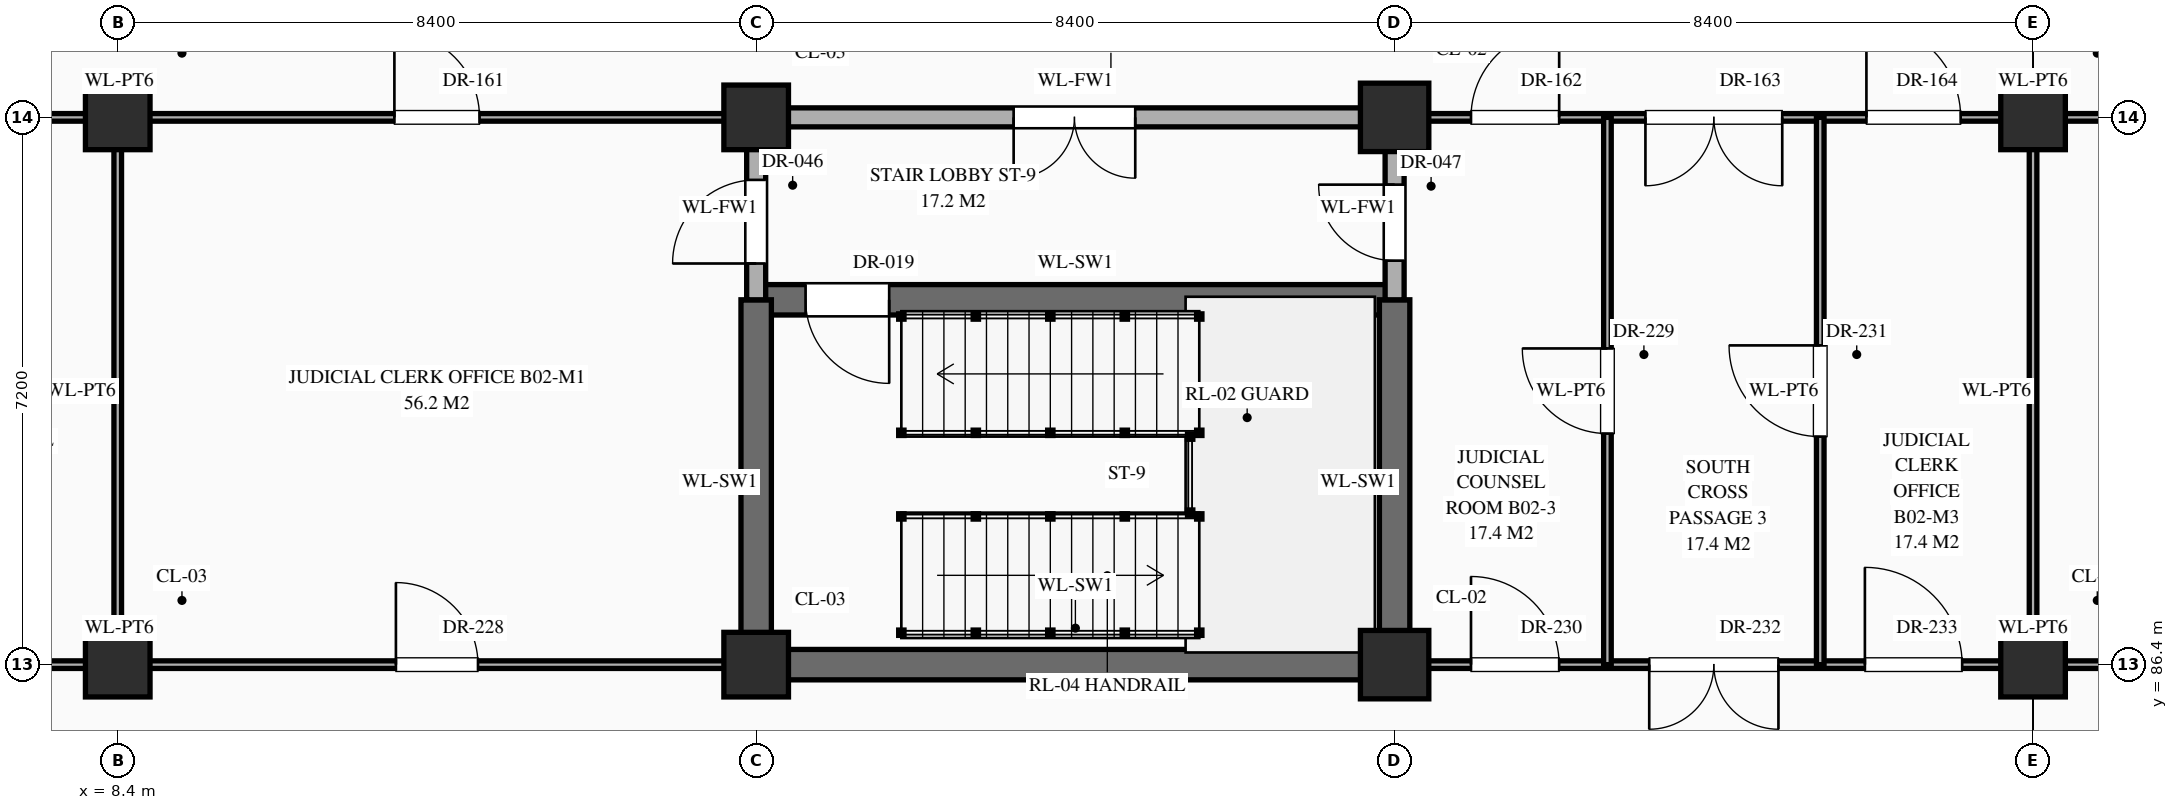
"""IFC4 building model, lengths in metres.
Left out: names, types, materials, properties, quantities, classifications, styles, units other than length and angle.
Written with IfcOpenShell. Run it as: python <this file> out.ifc"""

import sys

from ifc_helpers import new_model, si_unit, direction, frame, frame_2d, origin, origin_2d, place, context, subcontext, project, spatial, rectangle, extrude, element, fill, save


model = new_model("IFC4")
c1 = context("Model", 3, precision=1e-05, world=origin(), true_north=direction((0.0, 1.0)))
c2 = subcontext(c1, "Body", "Model", "MODEL_VIEW")
j1 = project(units=[si_unit("LENGTHUNIT", "METRE"), si_unit("PLANEANGLEUNIT", "RADIAN")], contexts=[c1])
p1 = place(None, origin())
s1 = spatial("IfcSite", under=j1, at=p1, CompositionType="ELEMENT")
p2 = place(p1, origin())
s2 = spatial("IfcBuilding", under=s1, at=p2, CompositionType="ELEMENT")
p3 = place(p2, frame((0.0, 0.0, -10.2)))
s3 = spatial("IfcBuildingStorey", under=s2, at=p3, CompositionType="ELEMENT", Elevation=-10.2)
for number, where, z_axis, x_axis in (
    (1, (8.4, 86.4, 0.0), (0.0, 0.0, 1.0), (1.0, 0.0, 0.0)),
    (2, (8.4, 93.6, 0.0), (0.0, 0.0, 1.0), (1.0, 0.0, 0.0)),
    (3, (16.8, 86.4, 0.0), (0.0, 0.0, 1.0), (1.0, 0.0, 0.0)),
    (4, (16.8, 93.6, 0.0), (0.0, 0.0, 1.0), (1.0, 0.0, 0.0)),
):
    element("IfcColumn", number, at=place(p3, frame(where, z_axis=z_axis, x_axis=x_axis)), inside=s3, PredefinedType="COLUMN", context=c2, shape_type="SweptSolid", body=[
        extrude(rectangle(XDim=0.85, YDim=0.85, at=origin_2d()), origin(), (0.0, 0.0, 1.0), 4.8),
    ])
for number, where, z_axis, x_axis in (
    (5, (25.2, 86.4, 0.0), (0.0, 0.0, 1.0), (1.0, 0.0, 0.0)),
    (6, (25.2, 93.6, 0.0), (0.0, 0.0, 1.0), (1.0, 0.0, 0.0)),
):
    element("IfcColumn", number, at=place(p3, frame(where, z_axis=z_axis, x_axis=x_axis)), inside=s3, PredefinedType="COLUMN", context=c2, shape_type="SweptSolid", body=[
        extrude(rectangle(XDim=0.9, YDim=0.9, at=origin_2d()), origin(), (0.0, 0.0, 1.0), 4.8),
    ])
for number, where, z_axis, x_axis in (
    (7, (33.6, 86.4, 0.0), (0.0, 0.0, 1.0), (1.0, 0.0, 0.0)),
    (8, (33.6, 93.6, 0.0), (0.0, 0.0, 1.0), (1.0, 0.0, 0.0)),
):
    element("IfcColumn", number, at=place(p3, frame(where, z_axis=z_axis, x_axis=x_axis)), inside=s3, PredefinedType="COLUMN", context=c2, shape_type="SweptSolid", body=[
        extrude(rectangle(XDim=0.85, YDim=0.85, at=origin_2d()), origin(), (0.0, 0.0, 1.0), 4.8),
    ])
p4 = place(p3, frame((0.04, 86.4, 0.0), z_axis=(0.0, 0.0, 1.0), x_axis=(1.0, 0.0, 0.0)))
e9 = element("IfcWall", 9, at=p4, inside=s3, PredefinedType="STANDARD", context=c2, shape_type="SweptSolid", body=[
    extrude(rectangle(XDim=16.76, YDim=0.1, at=frame_2d((8.38, 0.0))), origin(), (0.0, 0.0, 1.0), 3.63),
])
p5 = place(p4, frame((1.073, 0.0, 0.0)))
e10 = element("IfcOpeningElement", 10, at=p5, cuts=e9, PredefinedType="OPENING", context=c2, shape_type="SweptSolid", body=[
    extrude(rectangle(XDim=0.92, YDim=2.15, at=frame_2d((0.46, 1.075))), frame((0.0, 0.062, 0.0), z_axis=(0.0, -1.0, 0.0), x_axis=(1.0, 0.0, 0.0)), (0.0, 0.0, 1.0), 0.124),
])
p6 = place(p4, frame((3.31, 0.0, 0.0)))
e11 = element("IfcOpeningElement", 11, at=p6, cuts=e9, PredefinedType="OPENING", context=c2, shape_type="SweptSolid", body=[
    extrude(rectangle(XDim=1.7, YDim=2.45, at=frame_2d((0.85, 1.225))), frame((0.0, 0.062, 0.0), z_axis=(0.0, -1.0, 0.0), x_axis=(1.0, 0.0, 0.0)), (0.0, 0.0, 1.0), 0.124),
])
p7 = place(p4, frame((6.268, 0.0, 0.0)))
e12 = element("IfcOpeningElement", 12, at=p7, cuts=e9, PredefinedType="OPENING", context=c2, shape_type="SweptSolid", body=[
    extrude(rectangle(XDim=1.04, YDim=2.2, at=frame_2d((0.52, 1.1))), frame((0.0, 0.062, 0.0), z_axis=(0.0, -1.0, 0.0), x_axis=(1.0, 0.0, 0.0)), (0.0, 0.0, 1.0), 0.124),
])
p8 = place(p4, frame((12.02, 0.0, 0.0)))
e13 = element("IfcOpeningElement", 13, at=p8, cuts=e9, PredefinedType="OPENING", context=c2, shape_type="SweptSolid", body=[
    extrude(rectangle(XDim=1.08, YDim=2.25, at=frame_2d((0.54, 1.125))), frame((0.0, 0.062, 0.0), z_axis=(0.0, -1.0, 0.0), x_axis=(1.0, 0.0, 0.0)), (0.0, 0.0, 1.0), 0.124),
])
p9 = place(p3, frame((16.8, 86.4, 0.0), z_axis=(0.0, 0.0, 1.0), x_axis=(1.0, 0.0, 0.0)))
e14 = element("IfcWall", 14, at=p9, inside=s3, PredefinedType="SHEAR", context=c2, shape_type="SweptSolid", body=[
    extrude(rectangle(XDim=8.4, YDim=0.4, at=frame_2d((4.2, 0.0))), origin(), (0.0, 0.0, 1.0), 4.48),
])
p10 = place(p3, frame((25.2, 86.4, 0.0), z_axis=(0.0, 0.0, 1.0), x_axis=(1.0, 0.0, 0.0)))
e15 = element("IfcWall", 15, at=p10, inside=s3, PredefinedType="STANDARD", context=c2, shape_type="SweptSolid", body=[
    extrude(rectangle(XDim=16.8, YDim=0.1, at=frame_2d((8.4, 0.0))), origin(), (0.0, 0.0, 1.0), 3.63),
])
p11 = place(p10, frame((1.005, 0.0, 0.0)))
e16 = element("IfcOpeningElement", 16, at=p11, cuts=e15, PredefinedType="OPENING", context=c2, shape_type="SweptSolid", body=[
    extrude(rectangle(XDim=1.16, YDim=2.3, at=frame_2d((0.58, 1.15))), frame((0.0, 0.062, 0.0), z_axis=(0.0, -1.0, 0.0), x_axis=(1.0, 0.0, 0.0)), (0.0, 0.0, 1.0), 0.124),
])
p12 = place(p10, frame((3.35, 0.0, 0.0)))
e17 = element("IfcOpeningElement", 17, at=p12, cuts=e15, PredefinedType="OPENING", context=c2, shape_type="SweptSolid", body=[
    extrude(rectangle(XDim=1.7, YDim=2.45, at=frame_2d((0.85, 1.225))), frame((0.0, 0.062, 0.0), z_axis=(0.0, -1.0, 0.0), x_axis=(1.0, 0.0, 0.0)), (0.0, 0.0, 1.0), 0.124),
])
p13 = place(p10, frame((6.188, 0.0, 0.0)))
e18 = element("IfcOpeningElement", 18, at=p13, cuts=e15, PredefinedType="OPENING", context=c2, shape_type="SweptSolid", body=[
    extrude(rectangle(XDim=1.28, YDim=2.35, at=frame_2d((0.64, 1.175))), frame((0.0, 0.062, 0.0), z_axis=(0.0, -1.0, 0.0), x_axis=(1.0, 0.0, 0.0)), (0.0, 0.0, 1.0), 0.124),
])
p14 = place(p10, frame((12.117, 0.0, 0.0)))
e19 = element("IfcOpeningElement", 19, at=p14, cuts=e15, PredefinedType="OPENING", context=c2, shape_type="SweptSolid", body=[
    extrude(rectangle(XDim=0.94, YDim=2.3, at=frame_2d((0.47, 1.15))), frame((0.0, 0.062, 0.0), z_axis=(0.0, -1.0, 0.0), x_axis=(1.0, 0.0, 0.0)), (0.0, 0.0, 1.0), 0.124),
])
p15 = place(p3, frame((16.8, 91.2, 0.0), z_axis=(0.0, 0.0, 1.0), x_axis=(1.0, 0.0, 0.0)))
e20 = element("IfcWall", 20, at=p15, inside=s3, PredefinedType="SHEAR", context=c2, shape_type="SweptSolid", body=[
    extrude(rectangle(XDim=8.4, YDim=0.4, at=frame_2d((4.2, 0.0))), origin(), (0.0, 0.0, 1.0), 4.48),
])
p16 = place(p15, frame((0.65, 0.0, 0.0)))
e21 = element("IfcOpeningElement", 21, at=p16, cuts=e20, PredefinedType="OPENING", context=c2, shape_type="SweptSolid", body=[
    extrude(rectangle(XDim=1.1, YDim=2.2, at=frame_2d((0.55, 1.1))), frame((0.0, 0.212, 0.0), z_axis=(0.0, -1.0, 0.0), x_axis=(1.0, 0.0, 0.0)), (0.0, 0.0, 1.0), 0.424),
])
p17 = place(p3, frame((0.04, 93.6, 0.0), z_axis=(0.0, 0.0, 1.0), x_axis=(1.0, 0.0, 0.0)))
e22 = element("IfcWall", 22, at=p17, inside=s3, PredefinedType="STANDARD", context=c2, shape_type="SweptSolid", body=[
    extrude(rectangle(XDim=16.76, YDim=0.1, at=frame_2d((8.38, 0.0))), origin(), (0.0, 0.0, 1.0), 3.63),
])
p18 = place(p17, frame((1.032, 0.0, 0.0)))
e23 = element("IfcOpeningElement", 23, at=p18, cuts=e22, PredefinedType="OPENING", context=c2, shape_type="SweptSolid", body=[
    extrude(rectangle(XDim=1.0, YDim=2.25, at=frame_2d((0.5, 1.125))), frame((0.0, 0.062, 0.0), z_axis=(0.0, -1.0, 0.0), x_axis=(1.0, 0.0, 0.0)), (0.0, 0.0, 1.0), 0.124),
])
p19 = place(p17, frame((3.385, 0.0, 0.0)))
e24 = element("IfcOpeningElement", 24, at=p19, cuts=e22, PredefinedType="OPENING", context=c2, shape_type="SweptSolid", body=[
    extrude(rectangle(XDim=1.55, YDim=2.35, at=frame_2d((0.775, 1.175))), frame((0.0, 0.062, 0.0), z_axis=(0.0, -1.0, 0.0), x_axis=(1.0, 0.0, 0.0)), (0.0, 0.0, 1.0), 0.124),
])
p20 = place(p17, frame((6.248, 0.0, 0.0)))
e25 = element("IfcOpeningElement", 25, at=p20, cuts=e22, PredefinedType="OPENING", context=c2, shape_type="SweptSolid", body=[
    extrude(rectangle(XDim=1.08, YDim=2.25, at=frame_2d((0.54, 1.125))), frame((0.0, 0.062, 0.0), z_axis=(0.0, -1.0, 0.0), x_axis=(1.0, 0.0, 0.0)), (0.0, 0.0, 1.0), 0.124),
])
p21 = place(p17, frame((12.0, 0.0, 0.0)))
e26 = element("IfcOpeningElement", 26, at=p21, cuts=e22, PredefinedType="OPENING", context=c2, shape_type="SweptSolid", body=[
    extrude(rectangle(XDim=1.12, YDim=2.25, at=frame_2d((0.56, 1.125))), frame((0.0, 0.062, 0.0), z_axis=(0.0, -1.0, 0.0), x_axis=(1.0, 0.0, 0.0)), (0.0, 0.0, 1.0), 0.124),
])
p22 = place(p3, frame((16.8, 93.6, 0.0), z_axis=(0.0, 0.0, 1.0), x_axis=(1.0, 0.0, 0.0)))
e27 = element("IfcWall", 27, at=p22, inside=s3, PredefinedType="STANDARD", context=c2, shape_type="SweptSolid", body=[
    extrude(rectangle(XDim=8.4, YDim=0.25, at=frame_2d((4.2, 0.0))), origin(), (0.0, 0.0, 1.0), 3.63),
])
p23 = place(p22, frame((3.387, 0.0, 0.0)))
e28 = element("IfcOpeningElement", 28, at=p23, cuts=e27, PredefinedType="OPENING", context=c2, shape_type="SweptSolid", body=[
    extrude(rectangle(XDim=1.6, YDim=2.3, at=frame_2d((0.8, 1.15))), frame((0.0, 0.137, 0.0), z_axis=(0.0, -1.0, 0.0), x_axis=(1.0, 0.0, 0.0)), (0.0, 0.0, 1.0), 0.274),
])
p24 = place(p3, frame((25.2, 93.6, 0.0), z_axis=(0.0, 0.0, 1.0), x_axis=(1.0, 0.0, 0.0)))
e29 = element("IfcWall", 29, at=p24, inside=s3, PredefinedType="STANDARD", context=c2, shape_type="SweptSolid", body=[
    extrude(rectangle(XDim=16.8, YDim=0.1, at=frame_2d((8.4, 0.0))), origin(), (0.0, 0.0, 1.0), 3.63),
])
p25 = place(p24, frame((1.005, 0.0, 0.0)))
e30 = element("IfcOpeningElement", 30, at=p25, cuts=e29, PredefinedType="OPENING", context=c2, shape_type="SweptSolid", body=[
    extrude(rectangle(XDim=1.16, YDim=2.3, at=frame_2d((0.58, 1.15))), frame((0.0, 0.062, 0.0), z_axis=(0.0, -1.0, 0.0), x_axis=(1.0, 0.0, 0.0)), (0.0, 0.0, 1.0), 0.124),
])
p26 = place(p24, frame((3.3, 0.0, 0.0)))
e31 = element("IfcOpeningElement", 31, at=p26, cuts=e29, PredefinedType="OPENING", context=c2, shape_type="SweptSolid", body=[
    extrude(rectangle(XDim=1.8, YDim=2.5, at=frame_2d((0.9, 1.25))), frame((0.0, 0.062, 0.0), z_axis=(0.0, -1.0, 0.0), x_axis=(1.0, 0.0, 0.0)), (0.0, 0.0, 1.0), 0.124),
])
p27 = place(p24, frame((6.208, 0.0, 0.0)))
e32 = element("IfcOpeningElement", 32, at=p27, cuts=e29, PredefinedType="OPENING", context=c2, shape_type="SweptSolid", body=[
    extrude(rectangle(XDim=1.24, YDim=2.3, at=frame_2d((0.62, 1.15))), frame((0.0, 0.062, 0.0), z_axis=(0.0, -1.0, 0.0), x_axis=(1.0, 0.0, 0.0)), (0.0, 0.0, 1.0), 0.124),
])
p28 = place(p24, frame((11.948, 0.0, 0.0)))
e33 = element("IfcOpeningElement", 33, at=p28, cuts=e29, PredefinedType="OPENING", context=c2, shape_type="SweptSolid", body=[
    extrude(rectangle(XDim=1.28, YDim=2.35, at=frame_2d((0.64, 1.175))), frame((0.0, 0.062, 0.0), z_axis=(0.0, -1.0, 0.0), x_axis=(1.0, 0.0, 0.0)), (0.0, 0.0, 1.0), 0.124),
])
p29 = place(p3, frame((8.4, 86.4, 0.0), z_axis=(0.0, 0.0, 1.0), x_axis=(0.0, 1.0, 0.0)))
e34 = element("IfcWall", 34, at=p29, inside=s3, PredefinedType="STANDARD", context=c2, shape_type="SweptSolid", body=[
    extrude(rectangle(XDim=7.2, YDim=0.1, at=frame_2d((3.6, 0.0))), origin(), (0.0, 0.0, 1.0), 3.73),
])
p30 = place(p3, frame((16.8, 86.4, 0.0), z_axis=(0.0, 0.0, 1.0), x_axis=(0.0, 1.0, 0.0)))
e35 = element("IfcWall", 35, at=p30, inside=s3, PredefinedType="SHEAR", context=c2, shape_type="SweptSolid", body=[
    extrude(rectangle(XDim=4.8, YDim=0.4, at=frame_2d((2.4, 0.0))), origin(), (0.0, 0.0, 1.0), 4.48),
])
p31 = place(p3, frame((16.8, 91.2, 0.0), z_axis=(0.0, 0.0, 1.0), x_axis=(0.0, 1.0, 0.0)))
e36 = element("IfcWall", 36, at=p31, inside=s3, PredefinedType="STANDARD", context=c2, shape_type="SweptSolid", body=[
    extrude(rectangle(XDim=2.4, YDim=0.25, at=frame_2d((1.2, 0.0))), origin(), (0.0, 0.0, 1.0), 3.73),
])
p32 = place(p31, frame((0.478, 0.0, 0.0)))
e37 = element("IfcOpeningElement", 37, at=p32, cuts=e36, PredefinedType="OPENING", context=c2, shape_type="SweptSolid", body=[
    extrude(rectangle(XDim=1.1, YDim=2.2, at=frame_2d((0.55, 1.1))), frame((0.0, 0.137, 0.0), z_axis=(0.0, -1.0, 0.0), x_axis=(1.0, 0.0, 0.0)), (0.0, 0.0, 1.0), 0.274),
])
p33 = place(p3, frame((25.2, 86.4, 0.0), z_axis=(0.0, 0.0, 1.0), x_axis=(0.0, 1.0, 0.0)))
e38 = element("IfcWall", 38, at=p33, inside=s3, PredefinedType="SHEAR", context=c2, shape_type="SweptSolid", body=[
    extrude(rectangle(XDim=4.8, YDim=0.4, at=frame_2d((2.4, 0.0))), origin(), (0.0, 0.0, 1.0), 4.48),
])
p34 = place(p3, frame((25.2, 91.2, 0.0), z_axis=(0.0, 0.0, 1.0), x_axis=(0.0, 1.0, 0.0)))
e39 = element("IfcWall", 39, at=p34, inside=s3, PredefinedType="STANDARD", context=c2, shape_type="SweptSolid", body=[
    extrude(rectangle(XDim=2.4, YDim=0.25, at=frame_2d((1.2, 0.0))), origin(), (0.0, 0.0, 1.0), 3.73),
])
p35 = place(p34, frame((0.515, 0.0, 0.0)))
e40 = element("IfcOpeningElement", 40, at=p35, cuts=e39, PredefinedType="OPENING", context=c2, shape_type="SweptSolid", body=[
    extrude(rectangle(XDim=1.0, YDim=2.2, at=frame_2d((0.5, 1.1))), frame((0.0, 0.137, 0.0), z_axis=(0.0, -1.0, 0.0), x_axis=(1.0, 0.0, 0.0)), (0.0, 0.0, 1.0), 0.274),
])
p36 = place(p3, frame((28.0, 86.4, 0.0), z_axis=(0.0, 0.0, 1.0), x_axis=(0.0, 1.0, 0.0)))
e41 = element("IfcWall", 41, at=p36, inside=s3, PredefinedType="STANDARD", context=c2, shape_type="SweptSolid", body=[
    extrude(rectangle(XDim=7.2, YDim=0.1, at=frame_2d((3.6, 0.0))), origin(), (0.0, 0.0, 1.0), 4.48),
])
p37 = place(p36, frame((3.04, 0.0, 0.0)))
e42 = element("IfcOpeningElement", 42, at=p37, cuts=e41, PredefinedType="OPENING", context=c2, shape_type="SweptSolid", body=[
    extrude(rectangle(XDim=1.12, YDim=2.25, at=frame_2d((0.56, 1.125))), frame((0.0, 0.062, 0.0), z_axis=(0.0, -1.0, 0.0), x_axis=(1.0, 0.0, 0.0)), (0.0, 0.0, 1.0), 0.124),
])
p38 = place(p3, frame((30.8, 86.4, 0.0), z_axis=(0.0, 0.0, 1.0), x_axis=(0.0, 1.0, 0.0)))
e43 = element("IfcWall", 43, at=p38, inside=s3, PredefinedType="STANDARD", context=c2, shape_type="SweptSolid", body=[
    extrude(rectangle(XDim=7.2, YDim=0.1, at=frame_2d((3.6, 0.0))), origin(), (0.0, 0.0, 1.0), 4.48),
])
p39 = place(p38, frame((3.0, 0.0, 0.0)))
e44 = element("IfcOpeningElement", 44, at=p39, cuts=e43, PredefinedType="OPENING", context=c2, shape_type="SweptSolid", body=[
    extrude(rectangle(XDim=1.2, YDim=2.35, at=frame_2d((0.6, 1.175))), frame((0.0, 0.062, 0.0), z_axis=(0.0, -1.0, 0.0), x_axis=(1.0, 0.0, 0.0)), (0.0, 0.0, 1.0), 0.124),
])
p40 = place(p3, frame((33.6, 86.4, 0.0), z_axis=(0.0, 0.0, 1.0), x_axis=(0.0, 1.0, 0.0)))
e45 = element("IfcWall", 45, at=p40, inside=s3, PredefinedType="STANDARD", context=c2, shape_type="SweptSolid", body=[
    extrude(rectangle(XDim=7.2, YDim=0.1, at=frame_2d((3.6, 0.0))), origin(), (0.0, 0.0, 1.0), 3.73),
])
p41 = place(p16, frame((1.1, 0.0, 0.0), z_axis=(0.0, 0.0, 1.0), x_axis=(-1.0, 0.0, 0.0)))
e46 = element("IfcDoor", 46, at=p41, inside=s3, OperationType="SINGLE_SWING_LEFT", PredefinedType="DOOR", context=c2, shape_type="SweptSolid", body=[
    extrude(rectangle(XDim=1.1, YDim=2.2, at=frame_2d((0.55, 1.1))), frame((0.0, 0.025, 0.0), z_axis=(0.0, -1.0, 0.0), x_axis=(1.0, 0.0, 0.0)), (0.0, 0.0, 1.0), 0.05),
])
fill(e21, e46)
p42 = place(p23, frame((1.6, 0.0, 0.0), z_axis=(0.0, 0.0, 1.0), x_axis=(-1.0, 0.0, 0.0)))
e47 = element("IfcDoor", 47, at=p42, inside=s3, OperationType="DOUBLE_DOOR_SINGLE_SWING", PredefinedType="DOOR", context=c2, shape_type="SweptSolid", body=[
    extrude(rectangle(XDim=1.6, YDim=2.3, at=frame_2d((0.8, 1.15))), frame((0.0, 0.025, 0.0), z_axis=(0.0, -1.0, 0.0), x_axis=(1.0, 0.0, 0.0)), (0.0, 0.0, 1.0), 0.05),
])
fill(e28, e47)
p43 = place(p32, origin())
e48 = element("IfcDoor", 48, at=p43, inside=s3, OperationType="SINGLE_SWING_LEFT", PredefinedType="DOOR", context=c2, shape_type="SweptSolid", body=[
    extrude(rectangle(XDim=1.1, YDim=2.2, at=frame_2d((0.55, 1.1))), frame((0.0, 0.025, 0.0), z_axis=(0.0, -1.0, 0.0), x_axis=(1.0, 0.0, 0.0)), (0.0, 0.0, 1.0), 0.05),
])
fill(e37, e48)
p44 = place(p35, origin())
e49 = element("IfcDoor", 49, at=p44, inside=s3, OperationType="SINGLE_SWING_RIGHT", PredefinedType="DOOR", context=c2, shape_type="SweptSolid", body=[
    extrude(rectangle(XDim=1.0, YDim=2.2, at=frame_2d((0.5, 1.1))), frame((0.0, 0.025, 0.0), z_axis=(0.0, -1.0, 0.0), x_axis=(1.0, 0.0, 0.0)), (0.0, 0.0, 1.0), 0.05),
])
fill(e40, e49)
p45 = place(p21, origin())
e50 = element("IfcDoor", 50, at=p45, inside=s3, OperationType="SINGLE_SWING_LEFT", PredefinedType="DOOR", context=c2, shape_type="SweptSolid", body=[
    extrude(rectangle(XDim=1.12, YDim=2.25, at=frame_2d((0.56, 1.125))), frame((0.0, 0.025, 0.0), z_axis=(0.0, -1.0, 0.0), x_axis=(1.0, 0.0, 0.0)), (0.0, 0.0, 1.0), 0.05),
])
fill(e26, e50)
p46 = place(p25, origin())
e51 = element("IfcDoor", 51, at=p46, inside=s3, OperationType="SINGLE_SWING_RIGHT", PredefinedType="DOOR", context=c2, shape_type="SweptSolid", body=[
    extrude(rectangle(XDim=1.16, YDim=2.3, at=frame_2d((0.58, 1.15))), frame((0.0, 0.025, 0.0), z_axis=(0.0, -1.0, 0.0), x_axis=(1.0, 0.0, 0.0)), (0.0, 0.0, 1.0), 0.05),
])
fill(e30, e51)
p47 = place(p26, frame((1.8, 0.0, 0.0), z_axis=(0.0, 0.0, 1.0), x_axis=(-1.0, 0.0, 0.0)))
e52 = element("IfcDoor", 52, at=p47, inside=s3, OperationType="DOUBLE_DOOR_SINGLE_SWING", PredefinedType="DOOR", context=c2, shape_type="SweptSolid", body=[
    extrude(rectangle(XDim=1.8, YDim=2.5, at=frame_2d((0.9, 1.25))), frame((0.0, 0.025, 0.0), z_axis=(0.0, -1.0, 0.0), x_axis=(1.0, 0.0, 0.0)), (0.0, 0.0, 1.0), 0.05),
])
fill(e31, e52)
p48 = place(p27, origin())
e53 = element("IfcDoor", 53, at=p48, inside=s3, OperationType="SINGLE_SWING_LEFT", PredefinedType="DOOR", context=c2, shape_type="SweptSolid", body=[
    extrude(rectangle(XDim=1.24, YDim=2.3, at=frame_2d((0.62, 1.15))), frame((0.0, 0.025, 0.0), z_axis=(0.0, -1.0, 0.0), x_axis=(1.0, 0.0, 0.0)), (0.0, 0.0, 1.0), 0.05),
])
fill(e32, e53)
p49 = place(p8, origin())
e54 = element("IfcDoor", 54, at=p49, inside=s3, OperationType="SINGLE_SWING_LEFT", PredefinedType="DOOR", context=c2, shape_type="SweptSolid", body=[
    extrude(rectangle(XDim=1.08, YDim=2.25, at=frame_2d((0.54, 1.125))), frame((0.0, 0.025, 0.0), z_axis=(0.0, -1.0, 0.0), x_axis=(1.0, 0.0, 0.0)), (0.0, 0.0, 1.0), 0.05),
])
fill(e13, e54)
p50 = place(p37, origin())
e55 = element("IfcDoor", 55, at=p50, inside=s3, OperationType="SINGLE_SWING_RIGHT", PredefinedType="DOOR", context=c2, shape_type="SweptSolid", body=[
    extrude(rectangle(XDim=1.12, YDim=2.25, at=frame_2d((0.56, 1.125))), frame((0.0, 0.025, 0.0), z_axis=(0.0, -1.0, 0.0), x_axis=(1.0, 0.0, 0.0)), (0.0, 0.0, 1.0), 0.05),
])
fill(e42, e55)
p51 = place(p11, origin())
e56 = element("IfcDoor", 56, at=p51, inside=s3, OperationType="SINGLE_SWING_LEFT", PredefinedType="DOOR", context=c2, shape_type="SweptSolid", body=[
    extrude(rectangle(XDim=1.16, YDim=2.3, at=frame_2d((0.58, 1.15))), frame((0.0, 0.025, 0.0), z_axis=(0.0, -1.0, 0.0), x_axis=(1.0, 0.0, 0.0)), (0.0, 0.0, 1.0), 0.05),
])
fill(e16, e56)
p52 = place(p39, origin())
e57 = element("IfcDoor", 57, at=p52, inside=s3, OperationType="SINGLE_SWING_RIGHT", PredefinedType="DOOR", context=c2, shape_type="SweptSolid", body=[
    extrude(rectangle(XDim=1.2, YDim=2.35, at=frame_2d((0.6, 1.175))), frame((0.0, 0.025, 0.0), z_axis=(0.0, -1.0, 0.0), x_axis=(1.0, 0.0, 0.0)), (0.0, 0.0, 1.0), 0.05),
])
fill(e44, e57)
p53 = place(p12, frame((1.7, 0.0, 0.0), z_axis=(0.0, 0.0, 1.0), x_axis=(-1.0, 0.0, 0.0)))
e58 = element("IfcDoor", 58, at=p53, inside=s3, OperationType="DOUBLE_DOOR_SINGLE_SWING", PredefinedType="DOOR", context=c2, shape_type="SweptSolid", body=[
    extrude(rectangle(XDim=1.7, YDim=2.45, at=frame_2d((0.85, 1.225))), frame((0.0, 0.025, 0.0), z_axis=(0.0, -1.0, 0.0), x_axis=(1.0, 0.0, 0.0)), (0.0, 0.0, 1.0), 0.05),
])
fill(e17, e58)
p54 = place(p13, origin())
e59 = element("IfcDoor", 59, at=p54, inside=s3, OperationType="SINGLE_SWING_LEFT", PredefinedType="DOOR", context=c2, shape_type="SweptSolid", body=[
    extrude(rectangle(XDim=1.28, YDim=2.35, at=frame_2d((0.64, 1.175))), frame((0.0, 0.025, 0.0), z_axis=(0.0, -1.0, 0.0), x_axis=(1.0, 0.0, 0.0)), (0.0, 0.0, 1.0), 0.05),
])
fill(e18, e59)
save(model, sys.argv[1])
